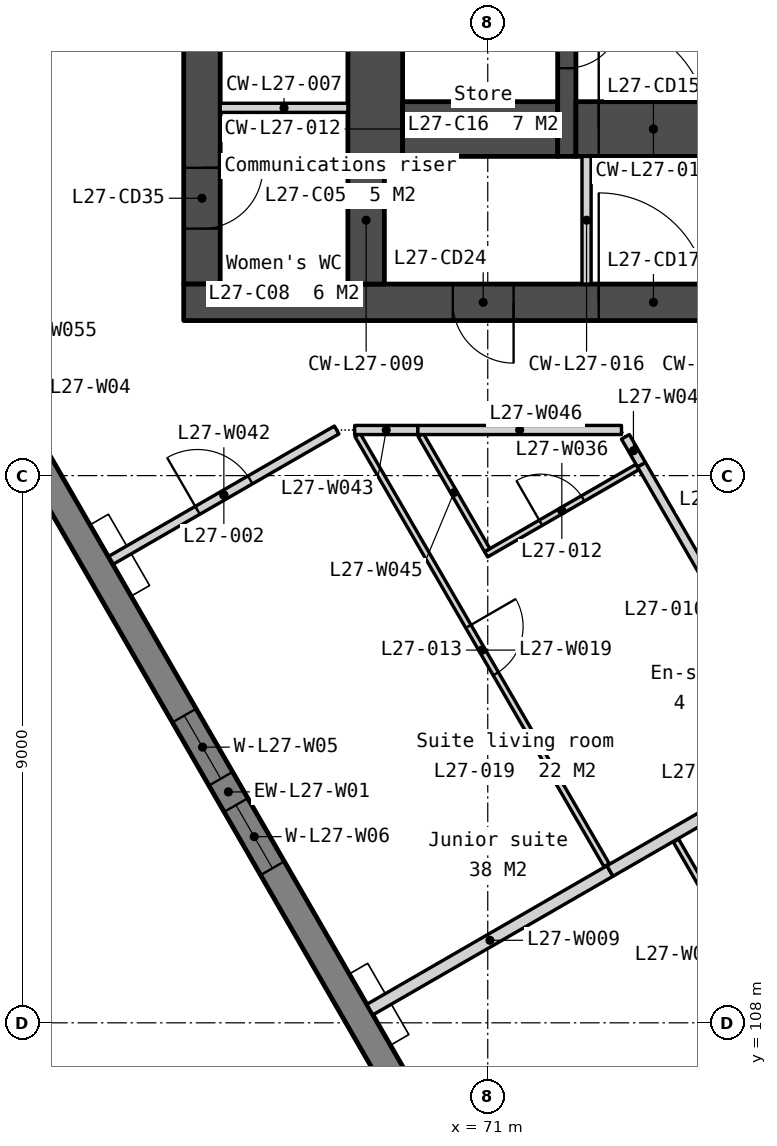
"""IFC4 building model, lengths in metres.
Left out: names, types, materials, properties, quantities, classifications, styles, units other than length and angle.
Written with IfcOpenShell. Run it as: python <this file> out.ifc"""

import sys

from ifc_helpers import new_model, si_unit, direction, frame, frame_2d, origin, place, context, subcontext, project, spatial, polyline, rectangle, outline, extrude, element, fill, save


model = new_model("IFC4")
c1 = context("Model", 3, precision=1e-05, world=origin(), true_north=direction((0.0, 1.0)))
c2 = subcontext(c1, "Body", "Model", "MODEL_VIEW")
j1 = project(units=[si_unit("LENGTHUNIT", "METRE"), si_unit("PLANEANGLEUNIT", "RADIAN")], contexts=[c1])
p1 = place(None, origin())
s1 = spatial("IfcSite", under=j1, at=p1, CompositionType="ELEMENT")
p2 = place(p1, origin())
s2 = spatial("IfcBuilding", under=s1, at=p2, CompositionType="ELEMENT")
p3 = place(p2, frame((0.0, 0.0, 109.8)))
s3 = spatial("IfcBuildingStorey", under=s2, at=p3, CompositionType="ELEMENT", Elevation=109.8)
p4 = place(p3, frame((66.3, 133.95, 0.0), z_axis=(0.0, 0.0, 1.0), x_axis=(0.0, -1.0, 0.0)))
e1 = element("IfcWall", 1, at=p4, inside=s3, PredefinedType="SOLIDWALL", context=c2, shape_type="SweptSolid", body=[
    extrude(rectangle(XDim=13.8, YDim=0.6, at=frame_2d((6.9, 0.0))), origin(), (0.0, 0.0, 1.0), 3.35),
])
p5 = place(p4, frame((0.6, 0.0, 0.0)))
e2 = element("IfcOpeningElement", 2, at=p5, cuts=e1, PredefinedType="OPENING", context=c2, shape_type="SweptSolid", body=[
    extrude(rectangle(XDim=1.1, YDim=2.1, at=frame_2d((0.55, 1.05))), frame((0.0, 0.31, 0.0), z_axis=(0.0, -1.0, 0.0), x_axis=(1.0, 0.0, 0.0)), (0.0, 0.0, 1.0), 0.62),
])
p6 = place(p4, frame((8.963, 0.0, 0.0)))
e3 = element("IfcOpeningElement", 3, at=p6, cuts=e1, PredefinedType="OPENING", context=c2, shape_type="SweptSolid", body=[
    extrude(rectangle(XDim=1.0, YDim=2.1, at=frame_2d((0.5, 1.05))), frame((0.0, 0.31, 0.0), z_axis=(0.0, -1.0, 0.0), x_axis=(1.0, 0.0, 0.0)), (0.0, 0.0, 1.0), 0.62),
])
p7 = place(p4, frame((11.888, 0.0, 0.0)))
e4 = element("IfcOpeningElement", 4, at=p7, cuts=e1, PredefinedType="OPENING", context=c2, shape_type="SweptSolid", body=[
    extrude(rectangle(XDim=1.0, YDim=2.1, at=frame_2d((0.5, 1.05))), frame((0.0, 0.31, 0.0), z_axis=(0.0, -1.0, 0.0), x_axis=(1.0, 0.0, 0.0)), (0.0, 0.0, 1.0), 0.62),
])
p8 = place(p3, frame((66.0, 119.85, 0.0), z_axis=(0.0, 0.0, 1.0), x_axis=(1.0, 0.0, 0.0)))
e5 = element("IfcWall", 5, at=p8, inside=s3, PredefinedType="SOLIDWALL", context=c2, shape_type="SweptSolid", body=[
    extrude(rectangle(XDim=28.0, YDim=0.6, at=frame_2d((14.0, 0.0))), origin(), (0.0, 0.0, 1.0), 3.35),
])
p9 = place(p8, frame((6.825, 0.0, 0.0)))
e6 = element("IfcOpeningElement", 6, at=p9, cuts=e5, PredefinedType="OPENING", context=c2, shape_type="SweptSolid", body=[
    extrude(rectangle(XDim=1.8, YDim=2.1, at=frame_2d((0.9, 1.05))), frame((0.0, 0.31, 0.0), z_axis=(0.0, -1.0, 0.0), x_axis=(1.0, 0.0, 0.0)), (0.0, 0.0, 1.0), 0.62),
])
p10 = place(p8, frame((15.85, 0.0, 0.0)))
e7 = element("IfcOpeningElement", 7, at=p10, cuts=e5, PredefinedType="OPENING", context=c2, shape_type="SweptSolid", body=[
    extrude(rectangle(XDim=1.5, YDim=2.1, at=frame_2d((0.75, 1.05))), frame((0.0, 0.31, 0.0), z_axis=(0.0, -1.0, 0.0), x_axis=(1.0, 0.0, 0.0)), (0.0, 0.0, 1.0), 0.62),
])
p11 = place(p8, frame((19.375, 0.0, 0.0)))
e8 = element("IfcOpeningElement", 8, at=p11, cuts=e5, PredefinedType="OPENING", context=c2, shape_type="SweptSolid", body=[
    extrude(rectangle(XDim=1.8, YDim=2.1, at=frame_2d((0.9, 1.05))), frame((0.0, 0.31, 0.0), z_axis=(0.0, -1.0, 0.0), x_axis=(1.0, 0.0, 0.0)), (0.0, 0.0, 1.0), 0.62),
])
p12 = place(p8, frame((4.425, 0.0, 0.0)))
e9 = element("IfcOpeningElement", 9, at=p12, cuts=e5, PredefinedType="OPENING", context=c2, shape_type="SweptSolid", body=[
    extrude(rectangle(XDim=1.0, YDim=2.1, at=frame_2d((0.5, 1.05))), frame((0.0, 0.31, 0.0), z_axis=(0.0, -1.0, 0.0), x_axis=(1.0, 0.0, 0.0)), (0.0, 0.0, 1.0), 0.62),
])
p13 = place(p8, frame((9.783, 0.0, 0.0)))
e10 = element("IfcOpeningElement", 10, at=p13, cuts=e5, PredefinedType="OPENING", context=c2, shape_type="SweptSolid", body=[
    extrude(rectangle(XDim=1.0, YDim=2.1, at=frame_2d((0.5, 1.05))), frame((0.0, 0.31, 0.0), z_axis=(0.0, -1.0, 0.0), x_axis=(1.0, 0.0, 0.0)), (0.0, 0.0, 1.0), 0.62),
])
p14 = place(p8, frame((11.525, 0.0, 0.0)))
e11 = element("IfcOpeningElement", 11, at=p14, cuts=e5, PredefinedType="OPENING", context=c2, shape_type="SweptSolid", body=[
    extrude(rectangle(XDim=1.0, YDim=2.1, at=frame_2d((0.5, 1.05))), frame((0.0, 0.31, 0.0), z_axis=(0.0, -1.0, 0.0), x_axis=(1.0, 0.0, 0.0)), (0.0, 0.0, 1.0), 0.62),
])
p15 = place(p8, frame((13.658, 0.0, 0.0)))
e12 = element("IfcOpeningElement", 12, at=p15, cuts=e5, PredefinedType="OPENING", context=c2, shape_type="SweptSolid", body=[
    extrude(rectangle(XDim=1.0, YDim=2.1, at=frame_2d((0.5, 1.05))), frame((0.0, 0.31, 0.0), z_axis=(0.0, -1.0, 0.0), x_axis=(1.0, 0.0, 0.0)), (0.0, 0.0, 1.0), 0.62),
])
p16 = place(p8, frame((22.575, 0.0, 0.0)))
e13 = element("IfcOpeningElement", 13, at=p16, cuts=e5, PredefinedType="OPENING", context=c2, shape_type="SweptSolid", body=[
    extrude(rectangle(XDim=1.0, YDim=2.1, at=frame_2d((0.5, 1.05))), frame((0.0, 0.31, 0.0), z_axis=(0.0, -1.0, 0.0), x_axis=(1.0, 0.0, 0.0)), (0.0, 0.0, 1.0), 0.62),
])
p17 = place(p3, frame((66.6, 123.049, 0.0), z_axis=(0.0, 0.0, 1.0), x_axis=(1.0, 0.0, 0.0)))
e14 = element("IfcWall", 14, at=p17, inside=s3, PredefinedType="PARTITIONING", context=c2, shape_type="SweptSolid", body=[
    extrude(rectangle(XDim=2.1, YDim=0.15, at=frame_2d((1.05, 0.0))), origin(), (0.0, 0.0, 1.0), 3.35),
])
p18 = place(p3, frame((69.15, 133.95, 0.0), z_axis=(0.0, 0.0, 1.0), x_axis=(0.0, -1.0, 0.0)))
e15 = element("IfcWall", 15, at=p18, inside=s3, PredefinedType="SOLIDWALL", context=c2, shape_type="SweptSolid", body=[
    extrude(rectangle(XDim=11.7, YDim=0.9, at=frame_2d((5.85, 0.0))), origin(), (0.0, 0.0, 1.0), 3.35),
])
p19 = place(p3, frame((69.0, 122.25, 0.0), z_axis=(0.0, 0.0, 1.0), x_axis=(0.0, -1.0, 0.0)))
e16 = element("IfcWall", 16, at=p19, inside=s3, PredefinedType="SOLIDWALL", context=c2, shape_type="SweptSolid", body=[
    extrude(rectangle(XDim=2.1, YDim=0.6, at=frame_2d((1.05, 0.0))), origin(), (0.0, 0.0, 1.0), 3.35),
])
p20 = place(p3, frame((69.6, 122.7, 0.0), z_axis=(0.0, 0.0, 1.0), x_axis=(1.0, 0.0, 0.0)))
e17 = element("IfcWall", 17, at=p20, inside=s3, PredefinedType="SOLIDWALL", context=c2, shape_type="SweptSolid", body=[
    extrude(rectangle(XDim=2.55, YDim=0.9, at=frame_2d((1.275, 0.0))), origin(), (0.0, 0.0, 1.0), 3.35),
])
p21 = place(p3, frame((72.3, 133.95, 0.0), z_axis=(0.0, 0.0, 1.0), x_axis=(0.0, -1.0, 0.0)))
e18 = element("IfcWall", 18, at=p21, inside=s3, PredefinedType="SOLIDWALL", context=c2, shape_type="SweptSolid", body=[
    extrude(rectangle(XDim=11.7, YDim=0.3, at=frame_2d((5.85, 0.0))), origin(), (0.0, 0.0, 1.0), 3.35),
])
p22 = place(p21, frame((6.95, 0.0, 0.0)))
e19 = element("IfcOpeningElement", 19, at=p22, cuts=e18, PredefinedType="OPENING", context=c2, shape_type="SweptSolid", body=[
    extrude(rectangle(XDim=1.1, YDim=2.1, at=frame_2d((0.55, 1.05))), frame((0.0, 0.16, 0.0), z_axis=(0.0, -1.0, 0.0), x_axis=(1.0, 0.0, 0.0)), (0.0, 0.0, 1.0), 0.32),
])
p23 = place(p21, frame((9.35, 0.0, 0.0)))
e20 = element("IfcOpeningElement", 20, at=p23, cuts=e18, PredefinedType="OPENING", context=c2, shape_type="SweptSolid", body=[
    extrude(rectangle(XDim=0.9, YDim=2.1, at=frame_2d((0.45, 1.05))), frame((0.0, 0.16, 0.0), z_axis=(0.0, -1.0, 0.0), x_axis=(1.0, 0.0, 0.0)), (0.0, 0.0, 1.0), 0.32),
])
p24 = place(p21, frame((5.1, 0.0, 0.0)))
e21 = element("IfcOpeningElement", 21, at=p24, cuts=e18, PredefinedType="OPENING", context=c2, shape_type="SweptSolid", body=[
    extrude(rectangle(XDim=1.0, YDim=2.1, at=frame_2d((0.5, 1.05))), frame((0.0, 0.16, 0.0), z_axis=(0.0, -1.0, 0.0), x_axis=(1.0, 0.0, 0.0)), (0.0, 0.0, 1.0), 0.32),
])
p25 = place(p3, frame((72.45, 122.7, 0.0), z_axis=(0.0, 0.0, 1.0), x_axis=(1.0, 0.0, 0.0)))
e22 = element("IfcWall", 22, at=p25, inside=s3, PredefinedType="SOLIDWALL", context=c2, shape_type="SweptSolid", body=[
    extrude(rectangle(XDim=2.55, YDim=0.9, at=frame_2d((1.275, 0.0))), origin(), (0.0, 0.0, 1.0), 3.35),
])
p26 = place(p25, frame((0.375, 0.0, 0.0)))
e23 = element("IfcOpeningElement", 23, at=p26, cuts=e22, PredefinedType="OPENING", context=c2, shape_type="SweptSolid", body=[
    extrude(rectangle(XDim=1.8, YDim=2.1, at=frame_2d((0.9, 1.05))), frame((0.0, 0.46, 0.0), z_axis=(0.0, -1.0, 0.0), x_axis=(1.0, 0.0, 0.0)), (0.0, 0.0, 1.0), 0.92),
])
p27 = place(p3, frame((72.625, 122.25, 0.0), z_axis=(0.0, 0.0, 1.0), x_axis=(0.0, -1.0, 0.0)))
e24 = element("IfcWall", 24, at=p27, inside=s3, PredefinedType="PARTITIONING", context=c2, shape_type="SweptSolid", body=[
    extrude(rectangle(XDim=2.1, YDim=0.15, at=frame_2d((1.05, 0.0))), origin(), (0.0, 0.0, 1.0), 3.35),
])
p28 = place(p3, frame((56.073, 130.263, -0.15), z_axis=(0.0, 0.0, 1.0), x_axis=(0.500000478905, -0.866025127289, 0.0)))
e25 = element("IfcWall", 25, at=p28, inside=s3, PredefinedType="SOLIDWALL", context=c2, shape_type="SweptSolid", body=[
    extrude(outline(polyline([(42.643, 0.0), (42.643, 3.5), (0.0, 3.5), (0.0, 0.0), (42.643, 0.0)])), frame((0.0, 0.225, 0.0), z_axis=(0.0, -1.0, 0.0), x_axis=(1.0, 0.0, 0.0)), (0.0, 0.0, 1.0), 0.45),
])
p29 = place(p28, frame((2.814, 0.0, 1.05)))
e26 = element("IfcOpeningElement", 26, at=p29, cuts=e25, PredefinedType="OPENING", context=c2, shape_type="SweptSolid", body=[
    extrude(rectangle(XDim=1.2, YDim=1.5, at=frame_2d((0.6, 0.75))), frame((0.0, 0.235, 0.0), z_axis=(0.0, -1.0, 0.0), x_axis=(1.0, 0.0, 0.0)), (0.0, 0.0, 1.0), 0.47),
])
p30 = place(p28, frame((4.514, 0.0, 1.05)))
e27 = element("IfcOpeningElement", 27, at=p30, cuts=e25, PredefinedType="OPENING", context=c2, shape_type="SweptSolid", body=[
    extrude(rectangle(XDim=1.2, YDim=1.5, at=frame_2d((0.6, 0.75))), frame((0.0, 0.235, 0.0), z_axis=(0.0, -1.0, 0.0), x_axis=(1.0, 0.0, 0.0)), (0.0, 0.0, 1.0), 0.47),
])
p31 = place(p28, frame((11.343, 0.0, 1.05)))
e28 = element("IfcOpeningElement", 28, at=p31, cuts=e25, PredefinedType="OPENING", context=c2, shape_type="SweptSolid", body=[
    extrude(rectangle(XDim=1.2, YDim=1.5, at=frame_2d((0.6, 0.75))), frame((0.0, 0.235, 0.0), z_axis=(0.0, -1.0, 0.0), x_axis=(1.0, 0.0, 0.0)), (0.0, 0.0, 1.0), 0.47),
])
p32 = place(p28, frame((13.043, 0.0, 1.05)))
e29 = element("IfcOpeningElement", 29, at=p32, cuts=e25, PredefinedType="OPENING", context=c2, shape_type="SweptSolid", body=[
    extrude(rectangle(XDim=1.2, YDim=1.5, at=frame_2d((0.6, 0.75))), frame((0.0, 0.235, 0.0), z_axis=(0.0, -1.0, 0.0), x_axis=(1.0, 0.0, 0.0)), (0.0, 0.0, 1.0), 0.47),
])
p33 = place(p28, frame((19.872, 0.0, 1.05)))
e30 = element("IfcOpeningElement", 30, at=p33, cuts=e25, PredefinedType="OPENING", context=c2, shape_type="SweptSolid", body=[
    extrude(rectangle(XDim=1.2, YDim=1.5, at=frame_2d((0.6, 0.75))), frame((0.0, 0.235, 0.0), z_axis=(0.0, -1.0, 0.0), x_axis=(1.0, 0.0, 0.0)), (0.0, 0.0, 1.0), 0.47),
])
p34 = place(p28, frame((21.572, 0.0, 1.05)))
e31 = element("IfcOpeningElement", 31, at=p34, cuts=e25, PredefinedType="OPENING", context=c2, shape_type="SweptSolid", body=[
    extrude(rectangle(XDim=1.2, YDim=1.5, at=frame_2d((0.6, 0.75))), frame((0.0, 0.235, 0.0), z_axis=(0.0, -1.0, 0.0), x_axis=(1.0, 0.0, 0.0)), (0.0, 0.0, 1.0), 0.47),
])
p35 = place(p28, frame((28.4, 0.0, 1.05)))
e32 = element("IfcOpeningElement", 32, at=p35, cuts=e25, PredefinedType="OPENING", context=c2, shape_type="SweptSolid", body=[
    extrude(rectangle(XDim=1.2, YDim=1.5, at=frame_2d((0.6, 0.75))), frame((0.0, 0.235, 0.0), z_axis=(0.0, -1.0, 0.0), x_axis=(1.0, 0.0, 0.0)), (0.0, 0.0, 1.0), 0.47),
])
p36 = place(p28, frame((30.1, 0.0, 1.05)))
e33 = element("IfcOpeningElement", 33, at=p36, cuts=e25, PredefinedType="OPENING", context=c2, shape_type="SweptSolid", body=[
    extrude(rectangle(XDim=1.2, YDim=1.5, at=frame_2d((0.6, 0.75))), frame((0.0, 0.235, 0.0), z_axis=(0.0, -1.0, 0.0), x_axis=(1.0, 0.0, 0.0)), (0.0, 0.0, 1.0), 0.47),
])
p37 = place(p28, frame((36.929, 0.0, 1.05)))
e34 = element("IfcOpeningElement", 34, at=p37, cuts=e25, PredefinedType="OPENING", context=c2, shape_type="SweptSolid", body=[
    extrude(rectangle(XDim=1.2, YDim=1.5, at=frame_2d((0.6, 0.75))), frame((0.0, 0.235, 0.0), z_axis=(0.0, -1.0, 0.0), x_axis=(1.0, 0.0, 0.0)), (0.0, 0.0, 1.0), 0.47),
])
p38 = place(p28, frame((38.629, 0.0, 1.05)))
e35 = element("IfcOpeningElement", 35, at=p38, cuts=e25, PredefinedType="OPENING", context=c2, shape_type="SweptSolid", body=[
    extrude(rectangle(XDim=1.2, YDim=1.5, at=frame_2d((0.6, 0.75))), frame((0.0, 0.235, 0.0), z_axis=(0.0, -1.0, 0.0), x_axis=(1.0, 0.0, 0.0)), (0.0, 0.0, 1.0), 0.47),
])
p39 = place(p3, frame((69.061, 108.217, 0.0), z_axis=(0.0, 0.0, 1.0), x_axis=(0.866030456496, 0.499991248344, 0.0)))
e36 = element("IfcWall", 36, at=p39, inside=s3, PredefinedType="PARTITIONING", context=c2, shape_type="SweptSolid", body=[
    extrude(rectangle(XDim=4.56, YDim=0.2, at=frame_2d((2.28, 0.0))), origin(), (0.0, 0.0, 1.0), 3.35),
])
p40 = place(p3, frame((74.096, 110.997, 0.0), z_axis=(0.0, 0.0, 1.0), x_axis=(0.499954256575, -0.866051812152, 0.0)))
e37 = element("IfcWall", 37, at=p40, inside=s3, PredefinedType="PARTITIONING", context=c2, shape_type="SweptSolid", body=[
    extrude(rectangle(XDim=2.34, YDim=0.1, at=frame_2d((1.17, 0.0))), origin(), (0.0, 0.0, 1.0), 3.35),
])
p41 = place(p3, frame((68.859, 117.668, 0.0), z_axis=(0.0, 0.0, 1.0), x_axis=(0.501038624871, -0.865424922444, 0.0)))
e38 = element("IfcWall", 38, at=p41, inside=s3, PredefinedType="PARTITIONING", context=c2, shape_type="SweptSolid", body=[
    extrude(rectangle(XDim=8.175, YDim=0.1, at=frame_2d((4.088, 0.0))), origin(), (0.0, 0.0, 1.0), 3.35),
])
p42 = place(p41, frame((3.638, 0.0, 0.0)))
e39 = element("IfcOpeningElement", 39, at=p42, cuts=e38, PredefinedType="OPENING", context=c2, shape_type="SweptSolid", body=[
    extrude(rectangle(XDim=0.9, YDim=2.1, at=frame_2d((0.45, 1.05))), frame((0.0, 0.06, 0.0), z_axis=(0.0, -1.0, 0.0), x_axis=(1.0, 0.0, 0.0)), (0.0, 0.0, 1.0), 0.12),
])
p43 = place(p3, frame((73.01, 110.497, 0.0), z_axis=(0.0, 0.0, 1.0), x_axis=(0.866012199007, 0.500022870649, 0.0)))
e40 = element("IfcWall", 40, at=p43, inside=s3, PredefinedType="PARTITIONING", context=c2, shape_type="SweptSolid", body=[
    extrude(rectangle(XDim=3.705, YDim=0.2, at=frame_2d((1.853, 0.0))), origin(), (0.0, 0.0, 1.0), 3.35),
])
p44 = place(p3, frame((70.973, 115.705, 0.0), z_axis=(0.0, 0.0, 1.0), x_axis=(0.866018712932, 0.500011588718, 0.0)))
e41 = element("IfcWall", 41, at=p44, inside=s3, PredefinedType="PARTITIONING", context=c2, shape_type="SweptSolid", body=[
    extrude(rectangle(XDim=2.875, YDim=0.1, at=frame_2d((1.438, 0.0))), origin(), (0.0, 0.0, 1.0), 3.35),
])
p45 = place(p44, frame((1.038, 0.0, 0.0)))
e42 = element("IfcOpeningElement", 42, at=p45, cuts=e41, PredefinedType="OPENING", context=c2, shape_type="SweptSolid", body=[
    extrude(rectangle(XDim=0.8, YDim=2.1, at=frame_2d((0.4, 1.05))), frame((0.0, 0.06, 0.0), z_axis=(0.0, -1.0, 0.0), x_axis=(1.0, 0.0, 0.0)), (0.0, 0.0, 1.0), 0.12),
])
p46 = place(p3, frame((73.528, 117.18, 0.0), z_axis=(0.0, 0.0, 1.0), x_axis=(0.500019337512, -0.866014238979, 0.0)))
e43 = element("IfcWall", 43, at=p46, inside=s3, PredefinedType="PARTITIONING", context=c2, shape_type="SweptSolid", body=[
    extrude(rectangle(XDim=5.529, YDim=0.15, at=frame_2d((2.764, 0.0))), origin(), (0.0, 0.0, 1.0), 3.35),
])
p47 = place(p46, frame((2.264, 0.0, 0.0)))
e44 = element("IfcOpeningElement", 44, at=p47, cuts=e43, PredefinedType="OPENING", context=c2, shape_type="SweptSolid", body=[
    extrude(rectangle(XDim=1.0, YDim=2.1, at=frame_2d((0.5, 1.05))), frame((0.0, 0.085, 0.0), z_axis=(0.0, -1.0, 0.0), x_axis=(1.0, 0.0, 0.0)), (0.0, 0.0, 1.0), 0.17),
])
p48 = place(p3, frame((64.805, 115.608, 0.0), z_axis=(0.0, 0.0, 1.0), x_axis=(0.86602138947, 0.500006952933, 0.0)))
e45 = element("IfcWall", 45, at=p48, inside=s3, PredefinedType="PARTITIONING", context=c2, shape_type="SweptSolid", body=[
    extrude(rectangle(XDim=4.284, YDim=0.15, at=frame_2d((2.142, 0.0))), origin(), (0.0, 0.0, 1.0), 3.35),
])
p49 = place(p48, frame((1.642, 0.0, 0.0)))
e46 = element("IfcOpeningElement", 46, at=p49, cuts=e45, PredefinedType="OPENING", context=c2, shape_type="SweptSolid", body=[
    extrude(rectangle(XDim=1.0, YDim=2.1, at=frame_2d((0.5, 1.05))), frame((0.0, 0.085, 0.0), z_axis=(0.0, -1.0, 0.0), x_axis=(1.0, 0.0, 0.0)), (0.0, 0.0, 1.0), 0.17),
])
p50 = place(p3, frame((68.811, 117.75, 0.0), z_axis=(0.0, 0.0, 1.0), x_axis=(1.0, 0.0, 0.0)))
e47 = element("IfcWall", 47, at=p50, inside=s3, PredefinedType="PARTITIONING", context=c2, shape_type="SweptSolid", body=[
    extrude(rectangle(XDim=1.039, YDim=0.15, at=frame_2d((0.52, 0.0))), origin(), (0.0, 0.0, 1.0), 3.35),
])
p51 = place(p3, frame((69.898, 117.668, 0.0), z_axis=(0.0, 0.0, 1.0), x_axis=(0.500028399337, -0.866009006799, 0.0)))
e48 = element("IfcWall", 48, at=p51, inside=s3, PredefinedType="PARTITIONING", context=c2, shape_type="SweptSolid", body=[
    extrude(rectangle(XDim=2.187, YDim=0.1, at=frame_2d((1.094, 0.0))), origin(), (0.0, 0.0, 1.0), 3.35),
])
p52 = place(p3, frame((69.851, 117.75, 0.0), z_axis=(0.0, 0.0, 1.0), x_axis=(1.0, 0.0, 0.0)))
e49 = element("IfcWall", 49, at=p52, inside=s3, PredefinedType="PARTITIONING", context=c2, shape_type="SweptSolid", body=[
    extrude(rectangle(XDim=3.349, YDim=0.15, at=frame_2d((1.674, 0.0))), origin(), (0.0, 0.0, 1.0), 3.35),
])
p53 = place(p3, frame((73.264, 117.637, 0.0), z_axis=(0.0, 0.0, 1.0), x_axis=(0.499869228027, -0.866100891855, 0.0)))
e50 = element("IfcWall", 50, at=p53, inside=s3, PredefinedType="PARTITIONING", context=c2, shape_type="SweptSolid", body=[
    extrude(rectangle(XDim=0.528, YDim=0.15, at=frame_2d((0.264, 0.0))), origin(), (0.0, 0.0, 1.0), 3.35),
])
p54 = place(p26, origin())
e51 = element("IfcDoor", 51, at=p54, inside=s3, OperationType="DOUBLE_DOOR_DOUBLE_SWING", PredefinedType="DOOR", context=c2, shape_type="SweptSolid", body=[
    extrude(rectangle(XDim=1.8, YDim=2.1, at=frame_2d((0.9, 1.05))), frame((0.0, 0.025, 0.0), z_axis=(0.0, -1.0, 0.0), x_axis=(1.0, 0.0, 0.0)), (0.0, 0.0, 1.0), 0.05),
])
fill(e23, e51)
p55 = place(p9, origin())
e52 = element("IfcDoor", 52, at=p55, inside=s3, OperationType="DOUBLE_DOOR_DOUBLE_SWING", PredefinedType="DOOR", context=c2, shape_type="SweptSolid", body=[
    extrude(rectangle(XDim=1.8, YDim=2.1, at=frame_2d((0.9, 1.05))), frame((0.0, 0.025, 0.0), z_axis=(0.0, -1.0, 0.0), x_axis=(1.0, 0.0, 0.0)), (0.0, 0.0, 1.0), 0.05),
])
fill(e6, e52)
p56 = place(p23, origin())
e53 = element("IfcDoor", 53, at=p56, inside=s3, OperationType="SINGLE_SWING_LEFT", PredefinedType="DOOR", context=c2, shape_type="SweptSolid", body=[
    extrude(rectangle(XDim=0.9, YDim=2.1, at=frame_2d((0.45, 1.05))), frame((0.0, 0.025, 0.0), z_axis=(0.0, -1.0, 0.0), x_axis=(1.0, 0.0, 0.0)), (0.0, 0.0, 1.0), 0.05),
])
fill(e20, e53)
p57 = place(p12, origin())
e54 = element("IfcDoor", 54, at=p57, inside=s3, OperationType="SINGLE_SWING_RIGHT", PredefinedType="DOOR", context=c2, shape_type="SweptSolid", body=[
    extrude(rectangle(XDim=1.0, YDim=2.1, at=frame_2d((0.5, 1.05))), frame((0.0, 0.025, 0.0), z_axis=(0.0, -1.0, 0.0), x_axis=(1.0, 0.0, 0.0)), (0.0, 0.0, 1.0), 0.05),
])
fill(e9, e54)
p58 = place(p7, origin())
e55 = element("IfcDoor", 55, at=p58, inside=s3, OperationType="SINGLE_SWING_LEFT", PredefinedType="DOOR", context=c2, shape_type="SweptSolid", body=[
    extrude(rectangle(XDim=1.0, YDim=2.1, at=frame_2d((0.5, 1.05))), frame((0.0, 0.025, 0.0), z_axis=(0.0, -1.0, 0.0), x_axis=(1.0, 0.0, 0.0)), (0.0, 0.0, 1.0), 0.05),
])
fill(e4, e55)
p59 = place(p33, origin())
e56 = element("IfcWindow", 56, at=p59, inside=s3, PartitioningType="SINGLE_PANEL", PredefinedType="WINDOW", context=c2, shape_type="SweptSolid", body=[
    extrude(rectangle(XDim=1.2, YDim=1.5, at=frame_2d((0.6, 0.75))), frame((0.0, 0.03, 0.0), z_axis=(0.0, -1.0, 0.0), x_axis=(1.0, 0.0, 0.0)), (0.0, 0.0, 1.0), 0.06),
])
fill(e30, e56)
p60 = place(p34, origin())
e57 = element("IfcWindow", 57, at=p60, inside=s3, PartitioningType="SINGLE_PANEL", PredefinedType="WINDOW", context=c2, shape_type="SweptSolid", body=[
    extrude(rectangle(XDim=1.2, YDim=1.5, at=frame_2d((0.6, 0.75))), frame((0.0, 0.03, 0.0), z_axis=(0.0, -1.0, 0.0), x_axis=(1.0, 0.0, 0.0)), (0.0, 0.0, 1.0), 0.06),
])
fill(e31, e57)
p61 = place(p49, origin())
e58 = element("IfcDoor", 58, at=p61, inside=s3, OperationType="SINGLE_SWING_LEFT", PredefinedType="DOOR", context=c2, shape_type="SweptSolid", body=[
    extrude(rectangle(XDim=1.0, YDim=2.1, at=frame_2d((0.5, 1.05))), frame((0.0, 0.025, 0.0), z_axis=(0.0, -1.0, 0.0), x_axis=(1.0, 0.0, 0.0)), (0.0, 0.0, 1.0), 0.05),
])
fill(e46, e58)
p62 = place(p45, origin())
e59 = element("IfcDoor", 59, at=p62, inside=s3, OperationType="SINGLE_SWING_LEFT", PredefinedType="DOOR", context=c2, shape_type="SweptSolid", body=[
    extrude(rectangle(XDim=0.8, YDim=2.1, at=frame_2d((0.4, 1.05))), frame((0.0, 0.025, 0.0), z_axis=(0.0, -1.0, 0.0), x_axis=(1.0, 0.0, 0.0)), (0.0, 0.0, 1.0), 0.05),
])
fill(e42, e59)
p63 = place(p42, origin())
e60 = element("IfcDoor", 60, at=p63, inside=s3, OperationType="SINGLE_SWING_LEFT", PredefinedType="DOOR", context=c2, shape_type="SweptSolid", body=[
    extrude(rectangle(XDim=0.9, YDim=2.1, at=frame_2d((0.45, 1.05))), frame((0.0, 0.025, 0.0), z_axis=(0.0, -1.0, 0.0), x_axis=(1.0, 0.0, 0.0)), (0.0, 0.0, 1.0), 0.05),
])
fill(e39, e60)
save(model, sys.argv[1])
